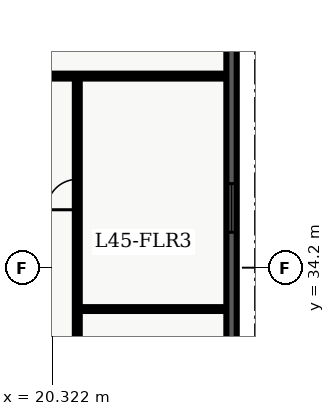
"""IFC4 building model, lengths in metres.
Left out: names, types, materials, properties, quantities, classifications, styles, units other than length and angle.
Written with IfcOpenShell. Run it as: python <this file> out.ifc"""

import sys

from ifc_helpers import new_model, entity, si_unit, converted_unit, direction, frame, origin_with_axes, origin_2d_with_axis, place, context, subcontext, project, spatial, polyline, rectangle, outline, extrude, element, fill, save


model = new_model("IFC4")
c1 = context("Model", 3, precision=1e-05, world=origin_with_axes(), true_north=direction((0.0, 1.0)))
c2 = subcontext(c1, "Body", "Model", "MODEL_VIEW")
j1 = project(units=[si_unit("LENGTHUNIT", "METRE"), converted_unit("PLANEANGLEUNIT", "DEGREE", entity("IfcPlaneAngleMeasure", 0.017), si_unit("PLANEANGLEUNIT", "RADIAN"), dimensions=[0, 0, 0, 0, 0, 0, 0])], contexts=[c1])
p1 = place(None, origin_with_axes())
s1 = spatial("IfcSite", under=j1, at=p1, CompositionType="ELEMENT")
p2 = place(p1, origin_with_axes())
s2 = spatial("IfcBuilding", under=s1, at=p2, CompositionType="ELEMENT")
p3 = place(p2, frame((0.0, 0.0, 183.6), z_axis=(0.0, 0.0, 1.0), x_axis=(1.0, 0.0, 0.0)))
s3 = spatial("IfcBuildingStorey", under=s2, at=p3, CompositionType="ELEMENT", Elevation=183.6)
p4 = place(p3, frame((2.6, 40.5, 0.0), z_axis=(0.0, 0.0, 1.0), x_axis=(1.0, 0.0, 0.0)))
e1 = element("IfcWall", 1, at=p4, inside=s3, PredefinedType="PARTITIONING", context=c2, shape_type="SweptSolid", body=[
    extrude(outline(polyline([(0.0, -0.08), (23.459, -0.08), (23.459, 0.08), (0.0, 0.08), (0.0, -0.08)])), origin_with_axes(), (0.0, 0.0, 1.0), 2.64),
])
p5 = place(p4, frame((2.422, 0.0, 0.0), z_axis=(0.0, 0.0, 1.0), x_axis=(1.0, 0.0, 0.0)))
e2 = element("IfcOpeningElement", 2, at=p5, cuts=e1, PredefinedType="OPENING", context=c2, shape_type="SweptSolid", body=[
    extrude(rectangle(XDim=1.0, YDim=0.18, at=origin_2d_with_axis()), origin_with_axes(), (0.0, 0.0, 1.0), 2.15),
])
p6 = place(p4, frame((7.756, 0.0, 0.0), z_axis=(0.0, 0.0, 1.0), x_axis=(1.0, 0.0, 0.0)))
e3 = element("IfcOpeningElement", 3, at=p6, cuts=e1, PredefinedType="OPENING", context=c2, shape_type="SweptSolid", body=[
    extrude(rectangle(XDim=1.0, YDim=0.18, at=origin_2d_with_axis()), origin_with_axes(), (0.0, 0.0, 1.0), 2.15),
])
p7 = place(p4, frame((14.089, 0.0, 0.0), z_axis=(0.0, 0.0, 1.0), x_axis=(1.0, 0.0, 0.0)))
e4 = element("IfcOpeningElement", 4, at=p7, cuts=e1, PredefinedType="OPENING", context=c2, shape_type="SweptSolid", body=[
    extrude(rectangle(XDim=1.2, YDim=0.18, at=origin_2d_with_axis()), origin_with_axes(), (0.0, 0.0, 1.0), 2.2),
])
p8 = place(p3, frame((21.15, 7.8, 0.0), z_axis=(0.0, 0.0, 1.0), x_axis=(0.0, 1.0, 0.0)))
e5 = element("IfcWall", 5, at=p8, inside=s3, PredefinedType="PARTITIONING", context=c2, shape_type="SweptSolid", body=[
    extrude(outline(polyline([(0.0, -0.08), (32.7, -0.08), (32.7, 0.08), (0.0, 0.08), (0.0, -0.08)])), origin_with_axes(), (0.0, 0.0, 1.0), 2.64),
])
p9 = place(p8, frame((16.456, 0.0, 0.0), z_axis=(0.0, 0.0, 1.0), x_axis=(1.0, 0.0, 0.0)))
e6 = element("IfcOpeningElement", 6, at=p9, cuts=e5, PredefinedType="OPENING", context=c2, shape_type="SweptSolid", body=[
    extrude(rectangle(XDim=1.0, YDim=0.18, at=origin_2d_with_axis()), origin_with_axes(), (0.0, 0.0, 1.0), 2.15),
])
p10 = place(p8, frame((22.009, 0.0, 0.0), z_axis=(0.0, 0.0, 1.0), x_axis=(1.0, 0.0, 0.0)))
e7 = element("IfcOpeningElement", 7, at=p10, cuts=e5, PredefinedType="OPENING", context=c2, shape_type="SweptSolid", body=[
    extrude(rectangle(XDim=1.0, YDim=0.18, at=origin_2d_with_axis()), origin_with_axes(), (0.0, 0.0, 1.0), 2.15),
])
p11 = place(p8, frame((28.803, 0.0, 0.0), z_axis=(0.0, 0.0, 1.0), x_axis=(1.0, 0.0, 0.0)))
e8 = element("IfcOpeningElement", 8, at=p11, cuts=e5, PredefinedType="OPENING", context=c2, shape_type="SweptSolid", body=[
    extrude(rectangle(XDim=1.0, YDim=0.18, at=origin_2d_with_axis()), origin_with_axes(), (0.0, 0.0, 1.0), 2.15),
])
p12 = place(p8, frame((5.775, 0.0, 0.0), z_axis=(0.0, 0.0, 1.0), x_axis=(1.0, 0.0, 0.0)))
e9 = element("IfcOpeningElement", 9, at=p12, cuts=e5, PredefinedType="OPENING", context=c2, shape_type="SweptSolid", body=[
    extrude(rectangle(XDim=1.05, YDim=0.18, at=origin_2d_with_axis()), origin_with_axes(), (0.0, 0.0, 1.0), 2.15),
])
p13 = place(p3, frame((21.3, 32.837, 0.0), z_axis=(0.0, 0.0, 1.0), x_axis=(1.0, 0.0, 0.0)))
e10 = element("IfcWall", 10, at=p13, inside=s3, PredefinedType="PARTITIONING", context=c2, shape_type="SweptSolid", body=[
    extrude(outline(polyline([(0.0, -0.062), (4.759, -0.062), (4.759, 0.062), (0.0, 0.062), (0.0, -0.062)])), origin_with_axes(), (0.0, 0.0, 1.0), 2.64),
])
p14 = place(p3, frame((26.224, 45.14, 0.0), z_axis=(0.0, 0.0, 1.0), x_axis=(0.0, -1.0, 0.0)))
e11 = element("IfcWall", 11, at=p14, inside=s3, PredefinedType="SOLIDWALL", context=c2, shape_type="SweptSolid", body=[
    extrude(outline(polyline([(0.0, -0.17), (23.54, -0.17), (23.54, 0.17), (0.0, 0.17), (0.0, -0.17)])), origin_with_axes(), (0.0, 0.0, 1.0), 3.6),
])
p15 = place(p14, frame((2.943, 0.0, 0.45), z_axis=(0.0, 0.0, 1.0), x_axis=(1.0, 0.0, 0.0)))
e12 = element("IfcOpeningElement", 12, at=p15, cuts=e11, PredefinedType="OPENING", context=c2, shape_type="SweptSolid", body=[
    extrude(rectangle(XDim=1.6, YDim=0.36, at=origin_2d_with_axis()), origin_with_axes(), (0.0, 0.0, 1.0), 2.2),
])
p16 = place(p14, frame((8.977, 0.0, 0.45), z_axis=(0.0, 0.0, 1.0), x_axis=(1.0, 0.0, 0.0)))
e13 = element("IfcOpeningElement", 13, at=p16, cuts=e11, PredefinedType="OPENING", context=c2, shape_type="SweptSolid", body=[
    extrude(rectangle(XDim=1.6, YDim=0.36, at=origin_2d_with_axis()), origin_with_axes(), (0.0, 0.0, 1.0), 2.2),
])
p17 = place(p14, frame((14.562, 0.0, 0.45), z_axis=(0.0, 0.0, 1.0), x_axis=(1.0, 0.0, 0.0)))
e14 = element("IfcOpeningElement", 14, at=p17, cuts=e11, PredefinedType="OPENING", context=c2, shape_type="SweptSolid", body=[
    extrude(rectangle(XDim=1.6, YDim=0.36, at=origin_2d_with_axis()), origin_with_axes(), (0.0, 0.0, 1.0), 2.2),
])
p18 = place(p14, frame((20.148, 0.0, 0.45), z_axis=(0.0, 0.0, 1.0), x_axis=(1.0, 0.0, 0.0)))
e15 = element("IfcOpeningElement", 15, at=p18, cuts=e11, PredefinedType="OPENING", context=c2, shape_type="SweptSolid", body=[
    extrude(rectangle(XDim=1.6, YDim=0.36, at=origin_2d_with_axis()), origin_with_axes(), (0.0, 0.0, 1.0), 2.2),
])
p19 = place(p8, frame((28.803, 0.0, 0.0), z_axis=(0.0, 0.0, 1.0), x_axis=(1.0, 0.0, 0.0)))
e16 = element("IfcDoor", 16, at=p19, inside=s3, OperationType="SINGLE_SWING_LEFT", PredefinedType="DOOR", context=c2, shape_type="SweptSolid", body=[
    extrude(rectangle(XDim=1.0, YDim=0.09, at=origin_2d_with_axis()), origin_with_axes(), (0.0, 0.0, 1.0), 2.15),
])
fill(e8, e16)
p20 = place(p14, frame((8.977, 0.0, 0.45), z_axis=(0.0, 0.0, 1.0), x_axis=(1.0, 0.0, 0.0)))
e17 = element("IfcWindow", 17, at=p20, inside=s3, PredefinedType="WINDOW", context=c2, shape_type="SweptSolid", body=[
    extrude(rectangle(XDim=1.6, YDim=0.09, at=origin_2d_with_axis()), origin_with_axes(), (0.0, 0.0, 1.0), 2.2),
])
fill(e13, e17)
save(model, sys.argv[1])
